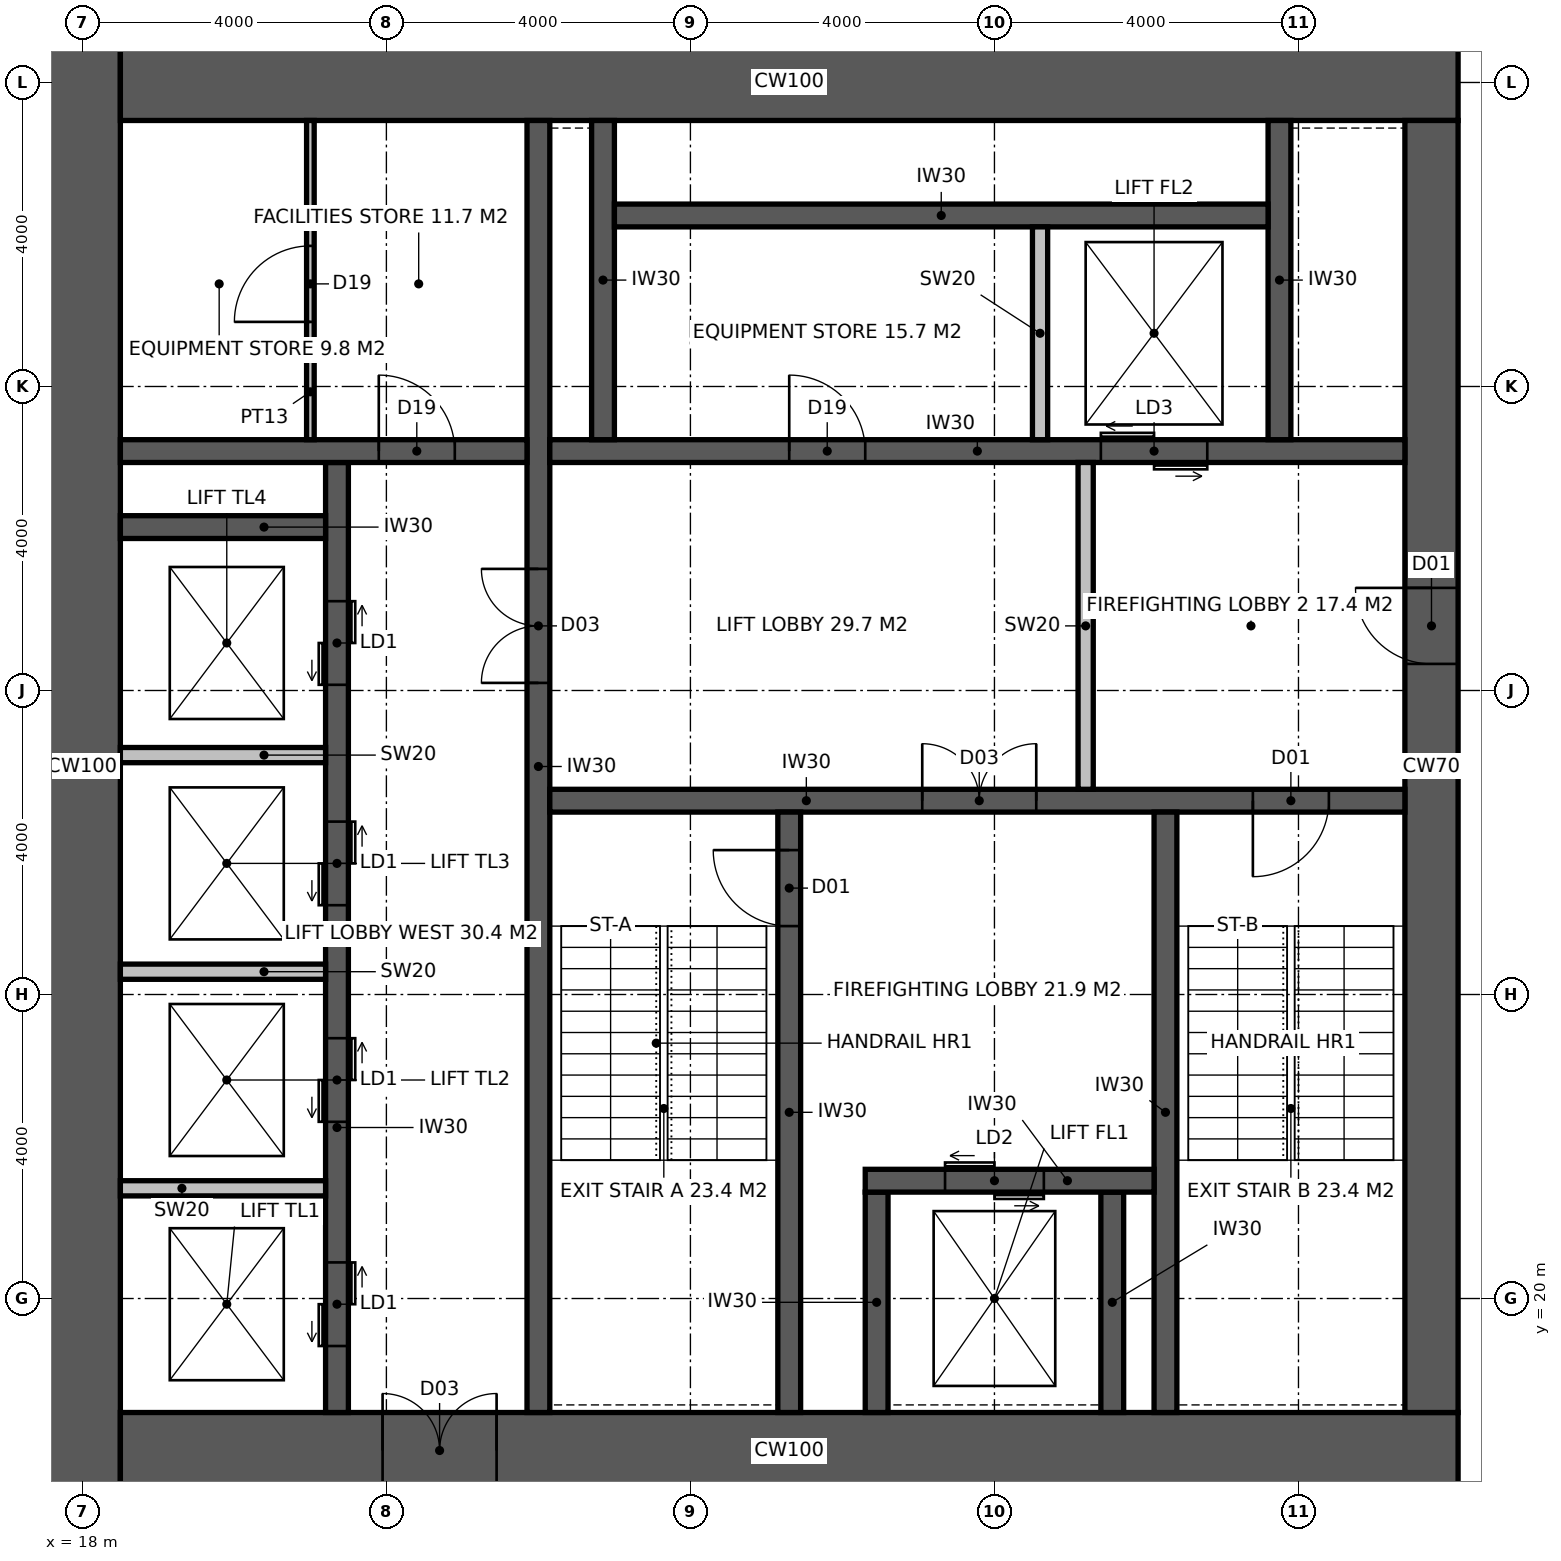
"""IFC4 building model, lengths in metres.
Left out: names, types, materials, properties, quantities, classifications, styles, units other than length and angle.
Written with IfcOpenShell. Run it as: python <this file> out.ifc"""

import sys

from ifc_helpers import new_model, si_unit, direction, frame, frame_2d, origin, place, context, subcontext, project, spatial, rectangle, extrude, element, fill, save


model = new_model("IFC4")
c1 = context("Model", 3, precision=1e-05, world=origin(), true_north=direction((0.0, 1.0)))
c2 = subcontext(c1, "Body", "Model", "MODEL_VIEW")
j1 = project(units=[si_unit("LENGTHUNIT", "METRE"), si_unit("PLANEANGLEUNIT", "RADIAN")], contexts=[c1])
p1 = place(None, origin())
s1 = spatial("IfcSite", under=j1, at=p1, CompositionType="ELEMENT")
p2 = place(p1, origin())
s2 = spatial("IfcBuilding", under=s1, at=p2, CompositionType="ELEMENT")
p3 = place(p2, frame((0.0, 0.0, 254.2)))
s3 = spatial("IfcBuildingStorey", under=s2, at=p3, CompositionType="ELEMENT", Elevation=254.2)
p4 = place(p3, frame((18.0, 17.5, -0.15), z_axis=(0.0, 0.0, 1.0), x_axis=(0.0, 1.0, 0.0)))
e1 = element("IfcWall", 1, at=p4, inside=s3, PredefinedType="SHEAR", context=c2, shape_type="SweptSolid", body=[
    extrude(rectangle(XDim=19.0, YDim=1.0, at=frame_2d((9.5, 0.0))), origin(), (0.0, 0.0, 1.0), 4.0),
])
p5 = place(p3, frame((18.5, 18.0, -0.15), z_axis=(0.0, 0.0, 1.0), x_axis=(1.0, 0.0, 0.0)))
e2 = element("IfcWall", 2, at=p5, inside=s3, PredefinedType="SHEAR", context=c2, shape_type="SweptSolid", body=[
    extrude(rectangle(XDim=17.6, YDim=1.0, at=frame_2d((8.8, 0.0))), origin(), (0.0, 0.0, 1.0), 4.0),
])
p6 = place(p5, frame((3.45, 0.0, 0.15)))
e3 = element("IfcOpeningElement", 3, at=p6, cuts=e2, PredefinedType="OPENING", context=c2, shape_type="SweptSolid", body=[
    extrude(rectangle(XDim=1.5, YDim=2.4, at=frame_2d((0.75, 1.2))), frame((0.0, 0.51, 0.0), z_axis=(0.0, -1.0, 0.0), x_axis=(1.0, 0.0, 0.0)), (0.0, 0.0, 1.0), 1.02),
])
p7 = place(p3, frame((18.5, 36.0, -0.15), z_axis=(0.0, 0.0, 1.0), x_axis=(1.0, 0.0, 0.0)))
e4 = element("IfcWall", 4, at=p7, inside=s3, PredefinedType="SHEAR", context=c2, shape_type="SweptSolid", body=[
    extrude(rectangle(XDim=17.6, YDim=1.0, at=frame_2d((8.8, 0.0))), origin(), (0.0, 0.0, 1.0), 4.0),
])
p8 = place(p3, frame((35.75, 18.5, -0.15), z_axis=(0.0, 0.0, 1.0), x_axis=(0.0, 1.0, 0.0)))
e5 = element("IfcWall", 5, at=p8, inside=s3, PredefinedType="SHEAR", context=c2, shape_type="SweptSolid", body=[
    extrude(rectangle(XDim=17.0, YDim=0.7, at=frame_2d((8.5, 0.0))), origin(), (0.0, 0.0, 1.0), 4.0),
])
p9 = place(p8, frame((9.85, 0.0, 0.15)))
e6 = element("IfcOpeningElement", 6, at=p9, cuts=e5, PredefinedType="OPENING", context=c2, shape_type="SweptSolid", body=[
    extrude(rectangle(XDim=1.0, YDim=2.2, at=frame_2d((0.5, 1.1))), frame((0.0, 0.36, 0.0), z_axis=(0.0, -1.0, 0.0), x_axis=(1.0, 0.0, 0.0)), (0.0, 0.0, 1.0), 0.72),
])
p10 = place(p3, frame((24.0, 18.5, -0.15), z_axis=(0.0, 0.0, 1.0), x_axis=(0.0, 1.0, 0.0)))
e7 = element("IfcWall", 7, at=p10, inside=s3, PredefinedType="SHEAR", context=c2, shape_type="SweptSolid", body=[
    extrude(rectangle(XDim=17.0, YDim=0.3, at=frame_2d((8.5, 0.0))), origin(), (0.0, 0.0, 1.0), 4.0),
])
p11 = place(p10, frame((9.6, 0.0, 0.15)))
e8 = element("IfcOpeningElement", 8, at=p11, cuts=e7, PredefinedType="OPENING", context=c2, shape_type="SweptSolid", body=[
    extrude(rectangle(XDim=1.5, YDim=2.4, at=frame_2d((0.75, 1.2))), frame((0.0, 0.16, 0.0), z_axis=(0.0, -1.0, 0.0), x_axis=(1.0, 0.0, 0.0)), (0.0, 0.0, 1.0), 0.32),
])
p12 = place(p3, frame((24.15, 26.55, -0.15), z_axis=(0.0, 0.0, 1.0), x_axis=(1.0, 0.0, 0.0)))
e9 = element("IfcWall", 9, at=p12, inside=s3, PredefinedType="SHEAR", context=c2, shape_type="SweptSolid", body=[
    extrude(rectangle(XDim=11.25, YDim=0.3, at=frame_2d((5.625, 0.0))), origin(), (0.0, 0.0, 1.0), 4.0),
])
p13 = place(p12, frame((9.25, 0.0, 0.15)))
e10 = element("IfcOpeningElement", 10, at=p13, cuts=e9, PredefinedType="OPENING", context=c2, shape_type="SweptSolid", body=[
    extrude(rectangle(XDim=1.0, YDim=2.2, at=frame_2d((0.5, 1.1))), frame((0.0, 0.16, 0.0), z_axis=(0.0, -1.0, 0.0), x_axis=(1.0, 0.0, 0.0)), (0.0, 0.0, 1.0), 0.32),
])
p14 = place(p12, frame((4.9, 0.0, 0.15)))
e11 = element("IfcOpeningElement", 11, at=p14, cuts=e9, PredefinedType="OPENING", context=c2, shape_type="SweptSolid", body=[
    extrude(rectangle(XDim=1.5, YDim=2.4, at=frame_2d((0.75, 1.2))), frame((0.0, 0.16, 0.0), z_axis=(0.0, -1.0, 0.0), x_axis=(1.0, 0.0, 0.0)), (0.0, 0.0, 1.0), 0.32),
])
p15 = place(p3, frame((27.3, 18.5, -0.15), z_axis=(0.0, 0.0, 1.0), x_axis=(0.0, 1.0, 0.0)))
e12 = element("IfcWall", 12, at=p15, inside=s3, PredefinedType="SHEAR", context=c2, shape_type="SweptSolid", body=[
    extrude(rectangle(XDim=7.9, YDim=0.3, at=frame_2d((3.95, 0.0))), origin(), (0.0, 0.0, 1.0), 4.0),
])
p16 = place(p15, frame((6.4, 0.0, 0.15)))
e13 = element("IfcOpeningElement", 13, at=p16, cuts=e12, PredefinedType="OPENING", context=c2, shape_type="SweptSolid", body=[
    extrude(rectangle(XDim=1.0, YDim=2.2, at=frame_2d((0.5, 1.1))), frame((0.0, 0.16, 0.0), z_axis=(0.0, -1.0, 0.0), x_axis=(1.0, 0.0, 0.0)), (0.0, 0.0, 1.0), 0.32),
])
p17 = place(p3, frame((32.25, 18.5, -0.15), z_axis=(0.0, 0.0, 1.0), x_axis=(0.0, 1.0, 0.0)))
e14 = element("IfcWall", 14, at=p17, inside=s3, PredefinedType="SHEAR", context=c2, shape_type="SweptSolid", body=[
    extrude(rectangle(XDim=7.9, YDim=0.3, at=frame_2d((3.95, 0.0))), origin(), (0.0, 0.0, 1.0), 4.0),
])
for number, where, z_axis, x_axis in (
    (15, (28.45, 18.5, -0.15), (0.0, 0.0, 1.0), (0.0, 1.0, 0.0)),
    (16, (31.55, 18.5, -0.15), (0.0, 0.0, 1.0), (0.0, 1.0, 0.0)),
):
    element("IfcWall", number, at=place(p3, frame(where, z_axis=z_axis, x_axis=x_axis)), inside=s3, PredefinedType="SHEAR", context=c2, shape_type="SweptSolid", body=[
        extrude(rectangle(XDim=2.9, YDim=0.3, at=frame_2d((1.45, 0.0))), origin(), (0.0, 0.0, 1.0), 4.0),
    ])
p18 = place(p3, frame((28.3, 21.55, -0.15), z_axis=(0.0, 0.0, 1.0), x_axis=(1.0, 0.0, 0.0)))
e17 = element("IfcWall", 17, at=p18, inside=s3, PredefinedType="SHEAR", context=c2, shape_type="SweptSolid", body=[
    extrude(rectangle(XDim=3.8, YDim=0.3, at=frame_2d((1.9, 0.0))), origin(), (0.0, 0.0, 1.0), 4.0),
])
p19 = place(p18, frame((1.05, 0.0, 0.15)))
e18 = element("IfcOpeningElement", 18, at=p19, cuts=e17, PredefinedType="OPENING", context=c2, shape_type="SweptSolid", body=[
    extrude(rectangle(XDim=1.3, YDim=2.4, at=frame_2d((0.65, 1.2))), frame((0.0, 0.16, 0.0), z_axis=(0.0, -1.0, 0.0), x_axis=(1.0, 0.0, 0.0)), (0.0, 0.0, 1.0), 0.32),
])
p20 = place(p3, frame((24.15, 31.15, -0.15), z_axis=(0.0, 0.0, 1.0), x_axis=(1.0, 0.0, 0.0)))
e19 = element("IfcWall", 19, at=p20, inside=s3, PredefinedType="SHEAR", context=c2, shape_type="SweptSolid", body=[
    extrude(rectangle(XDim=11.25, YDim=0.3, at=frame_2d((5.625, 0.0))), origin(), (0.0, 0.0, 1.0), 4.0),
])
p21 = place(p20, frame((3.15, 0.0, 0.15)))
e20 = element("IfcOpeningElement", 20, at=p21, cuts=e19, PredefinedType="OPENING", context=c2, shape_type="SweptSolid", body=[
    extrude(rectangle(XDim=1.0, YDim=2.2, at=frame_2d((0.5, 1.1))), frame((0.0, 0.16, 0.0), z_axis=(0.0, -1.0, 0.0), x_axis=(1.0, 0.0, 0.0)), (0.0, 0.0, 1.0), 0.32),
])
p22 = place(p20, frame((7.25, 0.0, 0.15)))
e21 = element("IfcOpeningElement", 21, at=p22, cuts=e19, PredefinedType="OPENING", context=c2, shape_type="SweptSolid", body=[
    extrude(rectangle(XDim=1.4, YDim=2.4, at=frame_2d((0.7, 1.2))), frame((0.0, 0.16, 0.0), z_axis=(0.0, -1.0, 0.0), x_axis=(1.0, 0.0, 0.0)), (0.0, 0.0, 1.0), 0.32),
])
p23 = place(p3, frame((21.35, 18.5, -0.15), z_axis=(0.0, 0.0, 1.0), x_axis=(0.0, 1.0, 0.0)))
e22 = element("IfcWall", 22, at=p23, inside=s3, PredefinedType="SHEAR", context=c2, shape_type="SweptSolid", body=[
    extrude(rectangle(XDim=12.5, YDim=0.3, at=frame_2d((6.25, 0.0))), origin(), (0.0, 0.0, 1.0), 4.0),
])
p24 = place(p23, frame((0.875, 0.0, 0.15)))
e23 = element("IfcOpeningElement", 23, at=p24, cuts=e22, PredefinedType="OPENING", context=c2, shape_type="SweptSolid", body=[
    extrude(rectangle(XDim=1.1, YDim=2.2, at=frame_2d((0.55, 1.1))), frame((0.0, 0.16, 0.0), z_axis=(0.0, -1.0, 0.0), x_axis=(1.0, 0.0, 0.0)), (0.0, 0.0, 1.0), 0.32),
])
p25 = place(p23, frame((3.825, 0.0, 0.15)))
e24 = element("IfcOpeningElement", 24, at=p25, cuts=e22, PredefinedType="OPENING", context=c2, shape_type="SweptSolid", body=[
    extrude(rectangle(XDim=1.1, YDim=2.2, at=frame_2d((0.55, 1.1))), frame((0.0, 0.16, 0.0), z_axis=(0.0, -1.0, 0.0), x_axis=(1.0, 0.0, 0.0)), (0.0, 0.0, 1.0), 0.32),
])
p26 = place(p23, frame((6.675, 0.0, 0.15)))
e25 = element("IfcOpeningElement", 25, at=p26, cuts=e22, PredefinedType="OPENING", context=c2, shape_type="SweptSolid", body=[
    extrude(rectangle(XDim=1.1, YDim=2.2, at=frame_2d((0.55, 1.1))), frame((0.0, 0.16, 0.0), z_axis=(0.0, -1.0, 0.0), x_axis=(1.0, 0.0, 0.0)), (0.0, 0.0, 1.0), 0.32),
])
p27 = place(p23, frame((9.575, 0.0, 0.15)))
e26 = element("IfcOpeningElement", 26, at=p27, cuts=e22, PredefinedType="OPENING", context=c2, shape_type="SweptSolid", body=[
    extrude(rectangle(XDim=1.1, YDim=2.2, at=frame_2d((0.55, 1.1))), frame((0.0, 0.16, 0.0), z_axis=(0.0, -1.0, 0.0), x_axis=(1.0, 0.0, 0.0)), (0.0, 0.0, 1.0), 0.32),
])
p28 = place(p3, frame((18.5, 31.15, -0.15), z_axis=(0.0, 0.0, 1.0), x_axis=(1.0, 0.0, 0.0)))
e27 = element("IfcWall", 27, at=p28, inside=s3, PredefinedType="SHEAR", context=c2, shape_type="SweptSolid", body=[
    extrude(rectangle(XDim=5.35, YDim=0.3, at=frame_2d((2.675, 0.0))), origin(), (0.0, 0.0, 1.0), 4.0),
])
p29 = place(p28, frame((3.4, 0.0, 0.15)))
e28 = element("IfcOpeningElement", 28, at=p29, cuts=e27, PredefinedType="OPENING", context=c2, shape_type="SweptSolid", body=[
    extrude(rectangle(XDim=1.0, YDim=2.2, at=frame_2d((0.5, 1.1))), frame((0.0, 0.16, 0.0), z_axis=(0.0, -1.0, 0.0), x_axis=(1.0, 0.0, 0.0)), (0.0, 0.0, 1.0), 0.32),
])
p30 = place(p3, frame((18.5, 30.15, -0.15), z_axis=(0.0, 0.0, 1.0), x_axis=(1.0, 0.0, 0.0)))
e29 = element("IfcWall", 29, at=p30, inside=s3, PredefinedType="SHEAR", context=c2, shape_type="SweptSolid", body=[
    extrude(rectangle(XDim=2.7, YDim=0.3, at=frame_2d((1.35, 0.0))), origin(), (0.0, 0.0, 1.0), 4.0),
])
for number, where, z_axis, x_axis in (
    (30, (24.85, 31.3, -0.15), (0.0, 0.0, 1.0), (0.0, 1.0, 0.0)),
    (31, (33.75, 31.3, -0.15), (0.0, 0.0, 1.0), (0.0, 1.0, 0.0)),
):
    element("IfcWall", number, at=place(p3, frame(where, z_axis=z_axis, x_axis=x_axis)), inside=s3, PredefinedType="SHEAR", context=c2, shape_type="SweptSolid", body=[
        extrude(rectangle(XDim=4.2, YDim=0.3, at=frame_2d((2.1, 0.0))), origin(), (0.0, 0.0, 1.0), 4.0),
    ])
p31 = place(p3, frame((25.0, 34.25, -0.15), z_axis=(0.0, 0.0, 1.0), x_axis=(1.0, 0.0, 0.0)))
e32 = element("IfcWall", 32, at=p31, inside=s3, PredefinedType="SHEAR", context=c2, shape_type="SweptSolid", body=[
    extrude(rectangle(XDim=8.6, YDim=0.3, at=frame_2d((4.3, 0.0))), origin(), (0.0, 0.0, 1.0), 4.0),
])
p32 = place(p3, frame((30.6, 31.3, -0.15), z_axis=(0.0, 0.0, 1.0), x_axis=(0.0, 1.0, 0.0)))
e33 = element("IfcWall", 33, at=p32, inside=s3, PredefinedType="SOLIDWALL", context=c2, shape_type="SweptSolid", body=[
    extrude(rectangle(XDim=2.8, YDim=0.2, at=frame_2d((1.4, 0.0))), origin(), (0.0, 0.0, 1.0), 4.0),
])
for number, where, z_axis, x_axis in (
    (34, (18.5, 21.45, -0.15), (0.0, 0.0, 1.0), (1.0, 0.0, 0.0)),
    (35, (18.5, 24.3, -0.15), (0.0, 0.0, 1.0), (1.0, 0.0, 0.0)),
    (36, (18.5, 27.15, -0.15), (0.0, 0.0, 1.0), (1.0, 0.0, 0.0)),
):
    element("IfcWall", number, at=place(p3, frame(where, z_axis=z_axis, x_axis=x_axis)), inside=s3, PredefinedType="SOLIDWALL", context=c2, shape_type="SweptSolid", body=[
        extrude(rectangle(XDim=2.7, YDim=0.2, at=frame_2d((1.35, 0.0))), origin(), (0.0, 0.0, 1.0), 4.0),
    ])
p33 = place(p3, frame((31.2, 26.7, 0.0), z_axis=(0.0, 0.0, 1.0), x_axis=(0.0, 1.0, 0.0)))
e37 = element("IfcWall", 37, at=p33, inside=s3, PredefinedType="SOLIDWALL", context=c2, shape_type="SweptSolid", body=[
    extrude(rectangle(XDim=4.3, YDim=0.2, at=frame_2d((2.15, 0.0))), origin(), (0.0, 0.0, 1.0), 3.85),
])
p34 = place(p3, frame((21.0, 31.3, 0.0), z_axis=(0.0, 0.0, 1.0), x_axis=(0.0, 1.0, 0.0)))
e38 = element("IfcWall", 38, at=p34, inside=s3, PredefinedType="PARTITIONING", context=c2, shape_type="SweptSolid", body=[
    extrude(rectangle(XDim=4.2, YDim=0.1, at=frame_2d((2.1, 0.0))), origin(), (0.0, 0.0, 1.0), 3.85),
])
p35 = place(p34, frame((1.55, 0.0, 0.0)))
e39 = element("IfcOpeningElement", 39, at=p35, cuts=e38, PredefinedType="OPENING", context=c2, shape_type="SweptSolid", body=[
    extrude(rectangle(XDim=1.0, YDim=2.2, at=frame_2d((0.5, 1.1))), frame((0.0, 0.06, 0.0), z_axis=(0.0, -1.0, 0.0), x_axis=(1.0, 0.0, 0.0)), (0.0, 0.0, 1.0), 0.12),
])
p36 = place(p16, origin())
e40 = element("IfcDoor", 40, at=p36, inside=s3, OperationType="SINGLE_SWING_RIGHT", PredefinedType="DOOR", context=c2, shape_type="SweptSolid", body=[
    extrude(rectangle(XDim=1.0, YDim=2.2, at=frame_2d((0.5, 1.1))), frame((0.0, 0.025, 0.0), z_axis=(0.0, -1.0, 0.0), x_axis=(1.0, 0.0, 0.0)), (0.0, 0.0, 1.0), 0.05),
])
fill(e13, e40)
p37 = place(p13, frame((1.0, 0.0, 0.0), z_axis=(0.0, 0.0, 1.0), x_axis=(-1.0, 0.0, 0.0)))
e41 = element("IfcDoor", 41, at=p37, inside=s3, OperationType="SINGLE_SWING_RIGHT", PredefinedType="DOOR", context=c2, shape_type="SweptSolid", body=[
    extrude(rectangle(XDim=1.0, YDim=2.2, at=frame_2d((0.5, 1.1))), frame((0.0, 0.025, 0.0), z_axis=(0.0, -1.0, 0.0), x_axis=(1.0, 0.0, 0.0)), (0.0, 0.0, 1.0), 0.05),
])
fill(e10, e41)
p38 = place(p9, origin())
e42 = element("IfcDoor", 42, at=p38, inside=s3, OperationType="SINGLE_SWING_RIGHT", PredefinedType="DOOR", context=c2, shape_type="SweptSolid", body=[
    extrude(rectangle(XDim=1.0, YDim=2.2, at=frame_2d((0.5, 1.1))), frame((0.0, 0.025, 0.0), z_axis=(0.0, -1.0, 0.0), x_axis=(1.0, 0.0, 0.0)), (0.0, 0.0, 1.0), 0.05),
])
fill(e6, e42)
p39 = place(p14, origin())
e43 = element("IfcDoor", 43, at=p39, inside=s3, OperationType="DOUBLE_DOOR_DOUBLE_SWING", PredefinedType="DOOR", context=c2, shape_type="SweptSolid", body=[
    extrude(rectangle(XDim=1.5, YDim=2.4, at=frame_2d((0.75, 1.2))), frame((0.0, 0.025, 0.0), z_axis=(0.0, -1.0, 0.0), x_axis=(1.0, 0.0, 0.0)), (0.0, 0.0, 1.0), 0.05),
])
fill(e11, e43)
p40 = place(p11, origin())
e44 = element("IfcDoor", 44, at=p40, inside=s3, OperationType="DOUBLE_DOOR_DOUBLE_SWING", PredefinedType="DOOR", context=c2, shape_type="SweptSolid", body=[
    extrude(rectangle(XDim=1.5, YDim=2.4, at=frame_2d((0.75, 1.2))), frame((0.0, 0.025, 0.0), z_axis=(0.0, -1.0, 0.0), x_axis=(1.0, 0.0, 0.0)), (0.0, 0.0, 1.0), 0.05),
])
fill(e8, e44)
p41 = place(p29, origin())
e45 = element("IfcDoor", 45, at=p41, inside=s3, OperationType="SINGLE_SWING_LEFT", PredefinedType="DOOR", context=c2, shape_type="SweptSolid", body=[
    extrude(rectangle(XDim=1.0, YDim=2.2, at=frame_2d((0.5, 1.1))), frame((0.0, 0.025, 0.0), z_axis=(0.0, -1.0, 0.0), x_axis=(1.0, 0.0, 0.0)), (0.0, 0.0, 1.0), 0.05),
])
fill(e28, e45)
p42 = place(p35, origin())
e46 = element("IfcDoor", 46, at=p42, inside=s3, OperationType="SINGLE_SWING_LEFT", PredefinedType="DOOR", context=c2, shape_type="SweptSolid", body=[
    extrude(rectangle(XDim=1.0, YDim=2.2, at=frame_2d((0.5, 1.1))), frame((0.0, 0.025, 0.0), z_axis=(0.0, -1.0, 0.0), x_axis=(1.0, 0.0, 0.0)), (0.0, 0.0, 1.0), 0.05),
])
fill(e39, e46)
p43 = place(p21, origin())
e47 = element("IfcDoor", 47, at=p43, inside=s3, OperationType="SINGLE_SWING_LEFT", PredefinedType="DOOR", context=c2, shape_type="SweptSolid", body=[
    extrude(rectangle(XDim=1.0, YDim=2.2, at=frame_2d((0.5, 1.1))), frame((0.0, 0.025, 0.0), z_axis=(0.0, -1.0, 0.0), x_axis=(1.0, 0.0, 0.0)), (0.0, 0.0, 1.0), 0.05),
])
fill(e20, e47)
p44 = place(p6, origin())
e48 = element("IfcDoor", 48, at=p44, inside=s3, OperationType="DOUBLE_DOOR_DOUBLE_SWING", PredefinedType="DOOR", context=c2, shape_type="SweptSolid", body=[
    extrude(rectangle(XDim=1.5, YDim=2.4, at=frame_2d((0.75, 1.2))), frame((0.0, 0.025, 0.0), z_axis=(0.0, -1.0, 0.0), x_axis=(1.0, 0.0, 0.0)), (0.0, 0.0, 1.0), 0.05),
])
fill(e3, e48)
p45 = place(p19, origin())
e49 = element("IfcDoor", 49, at=p45, inside=s3, OperationType="DOUBLE_DOOR_SLIDING", PredefinedType="DOOR", context=c2, shape_type="SweptSolid", body=[
    extrude(rectangle(XDim=1.3, YDim=2.4, at=frame_2d((0.65, 1.2))), frame((0.0, 0.025, 0.0), z_axis=(0.0, -1.0, 0.0), x_axis=(1.0, 0.0, 0.0)), (0.0, 0.0, 1.0), 0.05),
])
fill(e18, e49)
p46 = place(p22, origin())
e50 = element("IfcDoor", 50, at=p46, inside=s3, OperationType="DOUBLE_DOOR_SLIDING", PredefinedType="DOOR", context=c2, shape_type="SweptSolid", body=[
    extrude(rectangle(XDim=1.4, YDim=2.4, at=frame_2d((0.7, 1.2))), frame((0.0, 0.025, 0.0), z_axis=(0.0, -1.0, 0.0), x_axis=(1.0, 0.0, 0.0)), (0.0, 0.0, 1.0), 0.05),
])
fill(e21, e50)
p47 = place(p24, origin())
e51 = element("IfcDoor", 51, at=p47, inside=s3, OperationType="DOUBLE_DOOR_SLIDING", PredefinedType="DOOR", context=c2, shape_type="SweptSolid", body=[
    extrude(rectangle(XDim=1.1, YDim=2.2, at=frame_2d((0.55, 1.1))), frame((0.0, 0.025, 0.0), z_axis=(0.0, -1.0, 0.0), x_axis=(1.0, 0.0, 0.0)), (0.0, 0.0, 1.0), 0.05),
])
fill(e23, e51)
p48 = place(p25, origin())
e52 = element("IfcDoor", 52, at=p48, inside=s3, OperationType="DOUBLE_DOOR_SLIDING", PredefinedType="DOOR", context=c2, shape_type="SweptSolid", body=[
    extrude(rectangle(XDim=1.1, YDim=2.2, at=frame_2d((0.55, 1.1))), frame((0.0, 0.025, 0.0), z_axis=(0.0, -1.0, 0.0), x_axis=(1.0, 0.0, 0.0)), (0.0, 0.0, 1.0), 0.05),
])
fill(e24, e52)
p49 = place(p26, origin())
e53 = element("IfcDoor", 53, at=p49, inside=s3, OperationType="DOUBLE_DOOR_SLIDING", PredefinedType="DOOR", context=c2, shape_type="SweptSolid", body=[
    extrude(rectangle(XDim=1.1, YDim=2.2, at=frame_2d((0.55, 1.1))), frame((0.0, 0.025, 0.0), z_axis=(0.0, -1.0, 0.0), x_axis=(1.0, 0.0, 0.0)), (0.0, 0.0, 1.0), 0.05),
])
fill(e25, e53)
p50 = place(p27, origin())
e54 = element("IfcDoor", 54, at=p50, inside=s3, OperationType="DOUBLE_DOOR_SLIDING", PredefinedType="DOOR", context=c2, shape_type="SweptSolid", body=[
    extrude(rectangle(XDim=1.1, YDim=2.2, at=frame_2d((0.55, 1.1))), frame((0.0, 0.025, 0.0), z_axis=(0.0, -1.0, 0.0), x_axis=(1.0, 0.0, 0.0)), (0.0, 0.0, 1.0), 0.05),
])
fill(e26, e54)
save(model, sys.argv[1])
